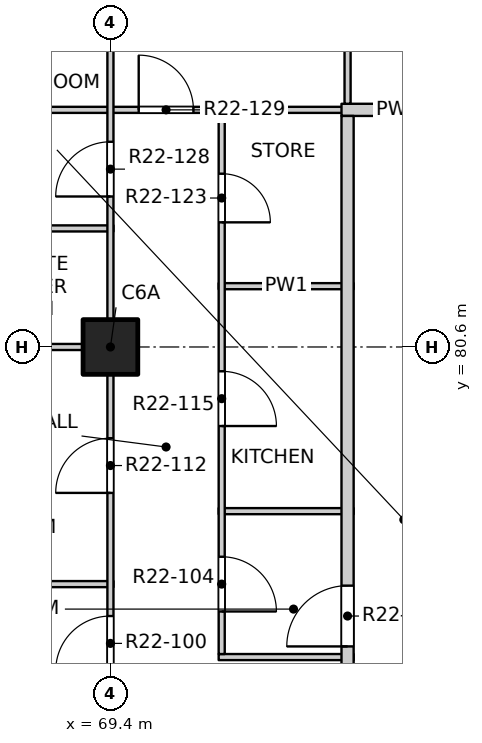
"""IFC4 building model, lengths in metres.
Left out: names, types, materials, properties, quantities, classifications, styles, units other than length and angle.
Written with IfcOpenShell. Run it as: python <this file> out.ifc"""

import sys

from ifc_helpers import new_model, si_unit, direction, frame, frame_2d, origin, origin_2d, place, context, subcontext, project, spatial, rectangle, extrude, element, fill, save


model = new_model("IFC4")
c1 = context("Model", 3, precision=1e-05, world=origin(), true_north=direction((0.0, 1.0)))
c2 = subcontext(c1, "Body", "Model", "MODEL_VIEW")
j1 = project(units=[si_unit("LENGTHUNIT", "METRE"), si_unit("PLANEANGLEUNIT", "RADIAN")], contexts=[c1])
p1 = place(None, origin())
s1 = spatial("IfcSite", under=j1, at=p1, CompositionType="ELEMENT")
p2 = place(p1, origin())
s2 = spatial("IfcBuilding", under=s1, at=p2, CompositionType="ELEMENT")
p3 = place(p2, frame((0.0, 0.0, 224.5)))
s3 = spatial("IfcBuildingStorey", under=s2, at=p3, CompositionType="ELEMENT", Elevation=224.5)
p4 = place(p3, frame((69.4, 80.6, -0.25), z_axis=(0.0, 0.0, 1.0), x_axis=(1.0, 0.0, 0.0)))
e1 = element("IfcColumn", 1, at=p4, inside=s3, PredefinedType="COLUMN", context=c2, shape_type="SweptSolid", body=[
    extrude(rectangle(XDim=0.9, YDim=0.9, at=origin_2d()), origin(), (0.0, 0.0, 1.0), 3.4),
])
p5 = place(p3, frame((71.18, 75.5, 0.0), z_axis=(0.0, 0.0, 1.0), x_axis=(1.0, 0.0, 0.0)))
e2 = element("IfcWall", 2, at=p5, inside=s3, PredefinedType="PARTITIONING", context=c2, shape_type="SweptSolid", body=[
    extrude(rectangle(XDim=2.22, YDim=0.1, at=frame_2d((1.11, 0.0))), origin(), (0.0, 0.0, 1.0), 3.15),
])
p6 = place(p3, frame((61.9, 76.7, 0.0), z_axis=(0.0, 0.0, 1.0), x_axis=(1.0, 0.0, 0.0)))
e3 = element("IfcWall", 3, at=p6, inside=s3, PredefinedType="PARTITIONING", context=c2, shape_type="SweptSolid", body=[
    extrude(rectangle(XDim=7.55, YDim=0.1, at=frame_2d((3.775, 0.0))), origin(), (0.0, 0.0, 1.0), 2.55),
])
p7 = place(p3, frame((71.18, 77.9, 0.0), z_axis=(0.0, 0.0, 1.0), x_axis=(1.0, 0.0, 0.0)))
e4 = element("IfcWall", 4, at=p7, inside=s3, PredefinedType="PARTITIONING", context=c2, shape_type="SweptSolid", body=[
    extrude(rectangle(XDim=2.22, YDim=0.1, at=frame_2d((1.11, 0.0))), origin(), (0.0, 0.0, 1.0), 3.15),
])
p8 = place(p3, frame((61.9, 80.6, 0.0), z_axis=(0.0, 0.0, 1.0), x_axis=(1.0, 0.0, 0.0)))
e5 = element("IfcWall", 5, at=p8, inside=s3, PredefinedType="PARTITIONING", context=c2, shape_type="SweptSolid", body=[
    extrude(rectangle(XDim=7.55, YDim=0.1, at=frame_2d((3.775, 0.0))), origin(), (0.0, 0.0, 1.0), 3.15),
])
p9 = place(p3, frame((71.18, 81.6, 0.0), z_axis=(0.0, 0.0, 1.0), x_axis=(1.0, 0.0, 0.0)))
e6 = element("IfcWall", 6, at=p9, inside=s3, PredefinedType="PARTITIONING", context=c2, shape_type="SweptSolid", body=[
    extrude(rectangle(XDim=2.22, YDim=0.1, at=frame_2d((1.11, 0.0))), origin(), (0.0, 0.0, 1.0), 3.15),
])
p10 = place(p3, frame((65.9, 82.55, 0.0), z_axis=(0.0, 0.0, 1.0), x_axis=(1.0, 0.0, 0.0)))
e7 = element("IfcWall", 7, at=p10, inside=s3, PredefinedType="PARTITIONING", context=c2, shape_type="SweptSolid", body=[
    extrude(rectangle(XDim=3.55, YDim=0.1, at=frame_2d((1.775, 0.0))), origin(), (0.0, 0.0, 1.0), 3.15),
])
p11 = place(p3, frame((61.9, 84.5, 0.0), z_axis=(0.0, 0.0, 1.0), x_axis=(1.0, 0.0, 0.0)))
e8 = element("IfcWall", 8, at=p11, inside=s3, PredefinedType="PARTITIONING", context=c2, shape_type="SweptSolid", body=[
    extrude(rectangle(XDim=11.5, YDim=0.1, at=frame_2d((5.75, 0.0))), origin(), (0.0, 0.0, 1.0), 3.15),
])
p12 = place(p11, frame((7.965, 0.0, 0.0)))
e9 = element("IfcOpeningElement", 9, at=p12, cuts=e8, PredefinedType="OPENING", context=c2, shape_type="SweptSolid", body=[
    extrude(rectangle(XDim=0.9, YDim=2.1, at=frame_2d((0.45, 1.05))), frame((0.0, 0.06, 0.0), z_axis=(0.0, -1.0, 0.0), x_axis=(1.0, 0.0, 0.0)), (0.0, 0.0, 1.0), 0.12),
])
p13 = place(p3, frame((73.2, 84.5, 0.0), z_axis=(0.0, 0.0, 1.0), x_axis=(1.0, 0.0, 0.0)))
e10 = element("IfcWall", 10, at=p13, inside=s3, PredefinedType="PARTITIONING", context=c2, shape_type="SweptSolid", body=[
    extrude(rectangle(XDim=1.85, YDim=0.2, at=frame_2d((0.925, 0.0))), origin(), (0.0, 0.0, 1.0), 3.15),
])
p14 = place(p3, frame((69.4, 41.9, 0.0), z_axis=(0.0, 0.0, 1.0), x_axis=(0.0, 1.0, 0.0)))
e11 = element("IfcWall", 11, at=p14, inside=s3, PredefinedType="PARTITIONING", context=c2, shape_type="SweptSolid", body=[
    extrude(rectangle(XDim=46.2, YDim=0.1, at=frame_2d((23.1, 0.0))), origin(), (0.0, 0.0, 1.0), 3.15),
])
p15 = place(p14, frame((1.2, 0.0, 0.0)))
e12 = element("IfcOpeningElement", 12, at=p15, cuts=e11, PredefinedType="OPENING", context=c2, shape_type="SweptSolid", body=[
    extrude(rectangle(XDim=0.9, YDim=2.1, at=frame_2d((0.45, 1.05))), frame((0.0, 0.06, 0.0), z_axis=(0.0, -1.0, 0.0), x_axis=(1.0, 0.0, 0.0)), (0.0, 0.0, 1.0), 0.12),
])
p16 = place(p14, frame((5.1, 0.0, 0.0)))
e13 = element("IfcOpeningElement", 13, at=p16, cuts=e11, PredefinedType="OPENING", context=c2, shape_type="SweptSolid", body=[
    extrude(rectangle(XDim=0.9, YDim=2.1, at=frame_2d((0.45, 1.05))), frame((0.0, 0.06, 0.0), z_axis=(0.0, -1.0, 0.0), x_axis=(1.0, 0.0, 0.0)), (0.0, 0.0, 1.0), 0.12),
])
p17 = place(p14, frame((9.0, 0.0, 0.0)))
e14 = element("IfcOpeningElement", 14, at=p17, cuts=e11, PredefinedType="OPENING", context=c2, shape_type="SweptSolid", body=[
    extrude(rectangle(XDim=0.9, YDim=2.1, at=frame_2d((0.45, 1.05))), frame((0.0, 0.06, 0.0), z_axis=(0.0, -1.0, 0.0), x_axis=(1.0, 0.0, 0.0)), (0.0, 0.0, 1.0), 0.12),
])
p18 = place(p14, frame((13.85, 0.0, 0.0)))
e15 = element("IfcOpeningElement", 15, at=p18, cuts=e11, PredefinedType="OPENING", context=c2, shape_type="SweptSolid", body=[
    extrude(rectangle(XDim=0.9, YDim=2.1, at=frame_2d((0.45, 1.05))), frame((0.0, 0.06, 0.0), z_axis=(0.0, -1.0, 0.0), x_axis=(1.0, 0.0, 0.0)), (0.0, 0.0, 1.0), 0.12),
])
p19 = place(p14, frame((17.775, 0.0, 0.0)))
e16 = element("IfcOpeningElement", 16, at=p19, cuts=e11, PredefinedType="OPENING", context=c2, shape_type="SweptSolid", body=[
    extrude(rectangle(XDim=0.9, YDim=2.1, at=frame_2d((0.45, 1.05))), frame((0.0, 0.06, 0.0), z_axis=(0.0, -1.0, 0.0), x_axis=(1.0, 0.0, 0.0)), (0.0, 0.0, 1.0), 0.12),
])
p20 = place(p14, frame((21.625, 0.0, 0.0)))
e17 = element("IfcOpeningElement", 17, at=p20, cuts=e11, PredefinedType="OPENING", context=c2, shape_type="SweptSolid", body=[
    extrude(rectangle(XDim=0.9, YDim=2.1, at=frame_2d((0.45, 1.05))), frame((0.0, 0.06, 0.0), z_axis=(0.0, -1.0, 0.0), x_axis=(1.0, 0.0, 0.0)), (0.0, 0.0, 1.0), 0.12),
])
p21 = place(p14, frame((24.6, 0.0, 0.0)))
e18 = element("IfcOpeningElement", 18, at=p21, cuts=e11, PredefinedType="OPENING", context=c2, shape_type="SweptSolid", body=[
    extrude(rectangle(XDim=0.9, YDim=2.1, at=frame_2d((0.45, 1.05))), frame((0.0, 0.06, 0.0), z_axis=(0.0, -1.0, 0.0), x_axis=(1.0, 0.0, 0.0)), (0.0, 0.0, 1.0), 0.12),
])
p22 = place(p14, frame((29.425, 0.0, 0.0)))
e19 = element("IfcOpeningElement", 19, at=p22, cuts=e11, PredefinedType="OPENING", context=c2, shape_type="SweptSolid", body=[
    extrude(rectangle(XDim=0.9, YDim=2.1, at=frame_2d((0.45, 1.05))), frame((0.0, 0.06, 0.0), z_axis=(0.0, -1.0, 0.0), x_axis=(1.0, 0.0, 0.0)), (0.0, 0.0, 1.0), 0.12),
])
p23 = place(p14, frame((33.375, 0.0, 0.0)))
e20 = element("IfcOpeningElement", 20, at=p23, cuts=e11, PredefinedType="OPENING", context=c2, shape_type="SweptSolid", body=[
    extrude(rectangle(XDim=0.9, YDim=2.1, at=frame_2d((0.45, 1.05))), frame((0.0, 0.06, 0.0), z_axis=(0.0, -1.0, 0.0), x_axis=(1.0, 0.0, 0.0)), (0.0, 0.0, 1.0), 0.12),
])
p24 = place(p14, frame((36.3, 0.0, 0.0)))
e21 = element("IfcOpeningElement", 21, at=p24, cuts=e11, PredefinedType="OPENING", context=c2, shape_type="SweptSolid", body=[
    extrude(rectangle(XDim=0.9, YDim=2.1, at=frame_2d((0.45, 1.05))), frame((0.0, 0.06, 0.0), z_axis=(0.0, -1.0, 0.0), x_axis=(1.0, 0.0, 0.0)), (0.0, 0.0, 1.0), 0.12),
])
p25 = place(p14, frame((41.175, 0.0, 0.0)))
e22 = element("IfcOpeningElement", 22, at=p25, cuts=e11, PredefinedType="OPENING", context=c2, shape_type="SweptSolid", body=[
    extrude(rectangle(XDim=0.9, YDim=2.1, at=frame_2d((0.45, 1.05))), frame((0.0, 0.06, 0.0), z_axis=(0.0, -1.0, 0.0), x_axis=(1.0, 0.0, 0.0)), (0.0, 0.0, 1.0), 0.12),
])
p26 = place(p14, frame((44.1, 0.0, 0.0)))
e23 = element("IfcOpeningElement", 23, at=p26, cuts=e11, PredefinedType="OPENING", context=c2, shape_type="SweptSolid", body=[
    extrude(rectangle(XDim=0.9, YDim=2.1, at=frame_2d((0.45, 1.05))), frame((0.0, 0.06, 0.0), z_axis=(0.0, -1.0, 0.0), x_axis=(1.0, 0.0, 0.0)), (0.0, 0.0, 1.0), 0.12),
])
p27 = place(p3, frame((71.23, 75.55, 0.0), z_axis=(0.0, 0.0, 1.0), x_axis=(0.0, 1.0, 0.0)))
e24 = element("IfcWall", 24, at=p27, inside=s3, PredefinedType="PARTITIONING", context=c2, shape_type="SweptSolid", body=[
    extrude(rectangle(XDim=8.9, YDim=0.1, at=frame_2d((4.45, 0.0))), origin(), (0.0, 0.0, 1.0), 3.15),
])
p28 = place(p27, frame((0.7, 0.0, 0.0)))
e25 = element("IfcOpeningElement", 25, at=p28, cuts=e24, PredefinedType="OPENING", context=c2, shape_type="SweptSolid", body=[
    extrude(rectangle(XDim=0.9, YDim=2.1, at=frame_2d((0.45, 1.05))), frame((0.0, 0.06, 0.0), z_axis=(0.0, -1.0, 0.0), x_axis=(1.0, 0.0, 0.0)), (0.0, 0.0, 1.0), 0.12),
])
p29 = place(p27, frame((3.75, 0.0, 0.0)))
e26 = element("IfcOpeningElement", 26, at=p29, cuts=e24, PredefinedType="OPENING", context=c2, shape_type="SweptSolid", body=[
    extrude(rectangle(XDim=0.9, YDim=2.1, at=frame_2d((0.45, 1.05))), frame((0.0, 0.06, 0.0), z_axis=(0.0, -1.0, 0.0), x_axis=(1.0, 0.0, 0.0)), (0.0, 0.0, 1.0), 0.12),
])
p30 = place(p27, frame((7.1, 0.0, 0.0)))
e27 = element("IfcOpeningElement", 27, at=p30, cuts=e24, PredefinedType="OPENING", context=c2, shape_type="SweptSolid", body=[
    extrude(rectangle(XDim=0.8, YDim=2.1, at=frame_2d((0.4, 1.05))), frame((0.0, 0.06, 0.0), z_axis=(0.0, -1.0, 0.0), x_axis=(1.0, 0.0, 0.0)), (0.0, 0.0, 1.0), 0.12),
])
p31 = place(p3, frame((73.3, 49.5, 0.0), z_axis=(0.0, 0.0, 1.0), x_axis=(0.0, 1.0, 0.0)))
e28 = element("IfcWall", 28, at=p31, inside=s3, PredefinedType="PARTITIONING", context=c2, shape_type="SweptSolid", body=[
    extrude(rectangle(XDim=34.9, YDim=0.2, at=frame_2d((17.45, 0.0))), origin(), (0.0, 0.0, 1.0), 3.15),
])
p32 = place(p31, frame((3.575, 0.0, 0.0)))
e29 = element("IfcOpeningElement", 29, at=p32, cuts=e28, PredefinedType="OPENING", context=c2, shape_type="SweptSolid", body=[
    extrude(rectangle(XDim=1.0, YDim=2.1, at=frame_2d((0.5, 1.05))), frame((0.0, 0.11, 0.0), z_axis=(0.0, -1.0, 0.0), x_axis=(1.0, 0.0, 0.0)), (0.0, 0.0, 1.0), 0.22),
])
p33 = place(p31, frame((18.075, 0.0, 0.0)))
e30 = element("IfcOpeningElement", 30, at=p33, cuts=e28, PredefinedType="OPENING", context=c2, shape_type="SweptSolid", body=[
    extrude(rectangle(XDim=1.0, YDim=2.1, at=frame_2d((0.5, 1.05))), frame((0.0, 0.11, 0.0), z_axis=(0.0, -1.0, 0.0), x_axis=(1.0, 0.0, 0.0)), (0.0, 0.0, 1.0), 0.22),
])
p34 = place(p31, frame((26.175, 0.0, 0.0)))
e31 = element("IfcOpeningElement", 31, at=p34, cuts=e28, PredefinedType="OPENING", context=c2, shape_type="SweptSolid", body=[
    extrude(rectangle(XDim=1.0, YDim=2.1, at=frame_2d((0.5, 1.05))), frame((0.0, 0.11, 0.0), z_axis=(0.0, -1.0, 0.0), x_axis=(1.0, 0.0, 0.0)), (0.0, 0.0, 1.0), 0.22),
])
p35 = place(p3, frame((73.3, 84.6, 0.0), z_axis=(0.0, 0.0, 1.0), x_axis=(0.0, 1.0, 0.0)))
e32 = element("IfcWall", 32, at=p35, inside=s3, PredefinedType="PARTITIONING", context=c2, shape_type="SweptSolid", body=[
    extrude(rectangle(XDim=3.5, YDim=0.1, at=frame_2d((1.75, 0.0))), origin(), (0.0, 0.0, 1.0), 3.15),
])
p36 = place(p35, frame((1.4, 0.0, 0.0)))
e33 = element("IfcOpeningElement", 33, at=p36, cuts=e32, PredefinedType="OPENING", context=c2, shape_type="SweptSolid", body=[
    extrude(rectangle(XDim=0.9, YDim=2.1, at=frame_2d((0.45, 1.05))), frame((0.0, 0.06, 0.0), z_axis=(0.0, -1.0, 0.0), x_axis=(1.0, 0.0, 0.0)), (0.0, 0.0, 1.0), 0.12),
])
p37 = place(p23, origin())
e34 = element("IfcDoor", 34, at=p37, inside=s3, OperationType="SINGLE_SWING_LEFT", PredefinedType="DOOR", context=c2, shape_type="SweptSolid", body=[
    extrude(rectangle(XDim=0.9, YDim=2.1, at=frame_2d((0.45, 1.05))), frame((0.0, 0.025, 0.0), z_axis=(0.0, -1.0, 0.0), x_axis=(1.0, 0.0, 0.0)), (0.0, 0.0, 1.0), 0.05),
])
fill(e20, e34)
p38 = place(p34, origin())
e35 = element("IfcDoor", 35, at=p38, inside=s3, OperationType="SINGLE_SWING_RIGHT", PredefinedType="DOOR", context=c2, shape_type="SweptSolid", body=[
    extrude(rectangle(XDim=1.0, YDim=2.1, at=frame_2d((0.5, 1.05))), frame((0.0, 0.025, 0.0), z_axis=(0.0, -1.0, 0.0), x_axis=(1.0, 0.0, 0.0)), (0.0, 0.0, 1.0), 0.05),
])
fill(e31, e35)
p39 = place(p28, origin())
e36 = element("IfcDoor", 36, at=p39, inside=s3, OperationType="SINGLE_SWING_RIGHT", PredefinedType="DOOR", context=c2, shape_type="SweptSolid", body=[
    extrude(rectangle(XDim=0.9, YDim=2.1, at=frame_2d((0.45, 1.05))), frame((0.0, 0.025, 0.0), z_axis=(0.0, -1.0, 0.0), x_axis=(1.0, 0.0, 0.0)), (0.0, 0.0, 1.0), 0.05),
])
fill(e25, e36)
p40 = place(p24, origin())
e37 = element("IfcDoor", 37, at=p40, inside=s3, OperationType="SINGLE_SWING_LEFT", PredefinedType="DOOR", context=c2, shape_type="SweptSolid", body=[
    extrude(rectangle(XDim=0.9, YDim=2.1, at=frame_2d((0.45, 1.05))), frame((0.0, 0.025, 0.0), z_axis=(0.0, -1.0, 0.0), x_axis=(1.0, 0.0, 0.0)), (0.0, 0.0, 1.0), 0.05),
])
fill(e21, e37)
p41 = place(p29, origin())
e38 = element("IfcDoor", 38, at=p41, inside=s3, OperationType="SINGLE_SWING_RIGHT", PredefinedType="DOOR", context=c2, shape_type="SweptSolid", body=[
    extrude(rectangle(XDim=0.9, YDim=2.1, at=frame_2d((0.45, 1.05))), frame((0.0, 0.025, 0.0), z_axis=(0.0, -1.0, 0.0), x_axis=(1.0, 0.0, 0.0)), (0.0, 0.0, 1.0), 0.05),
])
fill(e26, e38)
p42 = place(p30, origin())
e39 = element("IfcDoor", 39, at=p42, inside=s3, OperationType="SINGLE_SWING_RIGHT", PredefinedType="DOOR", context=c2, shape_type="SweptSolid", body=[
    extrude(rectangle(XDim=0.8, YDim=2.1, at=frame_2d((0.4, 1.05))), frame((0.0, 0.025, 0.0), z_axis=(0.0, -1.0, 0.0), x_axis=(1.0, 0.0, 0.0)), (0.0, 0.0, 1.0), 0.05),
])
fill(e27, e39)
p43 = place(p25, origin())
e40 = element("IfcDoor", 40, at=p43, inside=s3, OperationType="SINGLE_SWING_LEFT", PredefinedType="DOOR", context=c2, shape_type="SweptSolid", body=[
    extrude(rectangle(XDim=0.9, YDim=2.1, at=frame_2d((0.45, 1.05))), frame((0.0, 0.025, 0.0), z_axis=(0.0, -1.0, 0.0), x_axis=(1.0, 0.0, 0.0)), (0.0, 0.0, 1.0), 0.05),
])
fill(e22, e40)
p44 = place(p12, origin())
e41 = element("IfcDoor", 41, at=p44, inside=s3, OperationType="SINGLE_SWING_LEFT", PredefinedType="DOOR", context=c2, shape_type="SweptSolid", body=[
    extrude(rectangle(XDim=0.9, YDim=2.1, at=frame_2d((0.45, 1.05))), frame((0.0, 0.025, 0.0), z_axis=(0.0, -1.0, 0.0), x_axis=(1.0, 0.0, 0.0)), (0.0, 0.0, 1.0), 0.05),
])
fill(e9, e41)
save(model, sys.argv[1])
